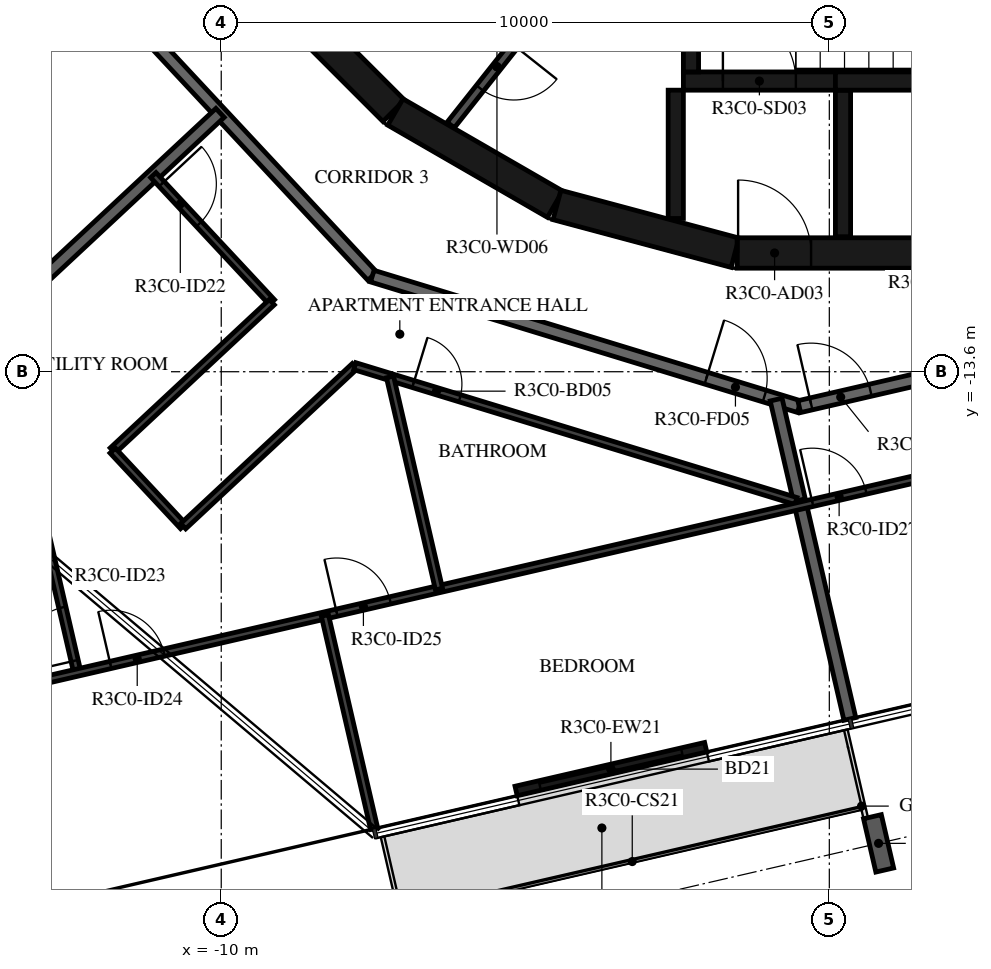
"""IFC4 building model, lengths in metres.
Left out: names, types, materials, properties, quantities, classifications, styles, units other than length and angle.
Written with IfcOpenShell. Run it as: python <this file> out.ifc"""

import sys

from ifc_helpers import new_model, si_unit, direction, frame, frame_2d, origin, origin_2d, place, context, subcontext, project, spatial, rectangle, i_section, extrude, element, fill, save


model = new_model("IFC4")
c1 = context("Model", 3, precision=1e-05, world=origin(), true_north=direction((0.0, 1.0)))
c2 = subcontext(c1, "Body", "Model", "MODEL_VIEW")
j1 = project(units=[si_unit("LENGTHUNIT", "METRE"), si_unit("PLANEANGLEUNIT", "RADIAN")], contexts=[c1])
p1 = place(None, origin())
s1 = spatial("IfcSite", under=j1, at=p1, CompositionType="ELEMENT")
p2 = place(p1, origin())
s2 = spatial("IfcBuilding", under=s1, at=p2, CompositionType="ELEMENT")
p3 = place(p2, frame((0.0, 0.0, 141.4)))
s3 = spatial("IfcBuildingStorey", under=s2, at=p3, CompositionType="ELEMENT", Elevation=141.4)
p4 = place(p3, frame((0.81, -21.356, -0.38), z_axis=(0.0, 0.0, 1.0), x_axis=(-0.974370073419, -0.224951016948, 0.0)))
e1 = element("IfcColumn", 1, at=p4, inside=s3, PredefinedType="COLUMN", context=c2, shape_type="SweptSolid", body=[
    extrude(i_section(OverallWidth=0.3, OverallDepth=0.9, WebThickness=0.019, FlangeThickness=0.035, FilletRadius=0.03, at=origin_2d()), origin(), (0.0, 0.0, 1.0), 2.616),
])
p5 = place(p3, frame((-5.151, -20.495, 0.0), z_axis=(0.0, 0.0, 1.0), x_axis=(0.974377048991, 0.224920800284, 0.0)))
e2 = element("IfcWall", 2, at=p5, inside=s3, PredefinedType="STANDARD", context=c2, shape_type="SweptSolid", body=[
    extrude(rectangle(XDim=3.2, YDim=0.16, at=frame_2d((1.6, 0.0))), origin(), (0.0, 0.0, 1.0), 3.05),
])
p6 = place(p5, frame((0.4, 0.0, 0.0)))
e3 = element("IfcOpeningElement", 3, at=p6, cuts=e2, PredefinedType="OPENING", context=c2, shape_type="SweptSolid", body=[
    extrude(rectangle(XDim=2.4, YDim=2.4, at=frame_2d((1.2, 1.2))), frame((0.0, 0.09, 0.0), z_axis=(0.0, -1.0, 0.0), x_axis=(1.0, 0.0, 0.0)), (0.0, 0.0, 1.0), 0.18),
])
p7 = place(p3, frame((-9.308, -7.164, 0.0), z_axis=(0.0, 0.0, 1.0), x_axis=(0.707106781187, -0.707106781187, 0.0)))
e4 = element("IfcWall", 4, at=p7, inside=s3, PredefinedType="SHEAR", context=c2, shape_type="SweptSolid", body=[
    extrude(rectangle(XDim=3.032, YDim=0.5, at=frame_2d((1.516, 0.0))), origin(), (0.0, 0.0, 1.0), 3.05),
])
for number, where, z_axis, x_axis in (
    (5, (-7.137, -9.329, 0.0), (0.0, 0.0, 1.0), (0.866, -0.5, 0.0)),
    (6, (-4.479, -10.858, 0.0), (0.0, 0.0, 1.0), (0.966, -0.259, 0.0)),
):
    element("IfcWall", number, at=place(p3, frame(where, z_axis=z_axis, x_axis=x_axis)), inside=s3, PredefinedType="SHEAR", context=c2, shape_type="SweptSolid", body=[
        extrude(rectangle(XDim=3.033, YDim=0.5, at=frame_2d((1.516, 0.0))), origin(), (0.0, 0.0, 1.0), 3.05),
    ])
p8 = place(p3, frame((-1.516, -11.647, 0.0), z_axis=(0.0, 0.0, 1.0), x_axis=(1.0, 0.0, 0.0)))
e7 = element("IfcWall", 7, at=p8, inside=s3, PredefinedType="SHEAR", context=c2, shape_type="SweptSolid", body=[
    extrude(rectangle(XDim=3.033, YDim=0.5, at=frame_2d((1.516, 0.0))), origin(), (0.0, 0.0, 1.0), 3.05),
])
p9 = place(p8, frame((0.016, 0.0, 0.0)))
e8 = element("IfcOpeningElement", 8, at=p9, cuts=e7, PredefinedType="OPENING", context=c2, shape_type="SweptSolid", body=[
    extrude(rectangle(XDim=1.2, YDim=2.1, at=frame_2d((0.6, 1.05))), frame((0.0, 0.26, 0.0), z_axis=(0.0, -1.0, 0.0), x_axis=(1.0, 0.0, 0.0)), (0.0, 0.0, 1.0), 0.52),
])
p10 = place(p3, frame((-2.275, -8.67, 0.0), z_axis=(0.0, 0.0, 1.0), x_axis=(0.0, 1.0, 0.0)))
e9 = element("IfcWall", 9, at=p10, inside=s3, PredefinedType="SHEAR", context=c2, shape_type="SweptSolid", body=[
    extrude(rectangle(XDim=3.32, YDim=0.25, at=frame_2d((1.66, 0.0))), origin(), (0.0, 0.0, 1.0), 3.05),
])
p11 = place(p3, frame((0.1, -8.82, 0.0), z_axis=(0.0, 0.0, 1.0), x_axis=(1.0, 0.0, 0.0)))
e10 = element("IfcWall", 10, at=p11, inside=s3, PredefinedType="SHEAR", context=c2, shape_type="SweptSolid", body=[
    extrude(rectangle(XDim=4.55, YDim=0.3, at=frame_2d((2.275, 0.0))), origin(), (0.0, 0.0, 1.0), 3.05),
])
p12 = place(p3, frame((-2.4, -8.82, 0.0), z_axis=(0.0, 0.0, 1.0), x_axis=(1.0, 0.0, 0.0)))
e11 = element("IfcWall", 11, at=p12, inside=s3, PredefinedType="SHEAR", context=c2, shape_type="SweptSolid", body=[
    extrude(rectangle(XDim=2.5, YDim=0.3, at=frame_2d((1.25, 0.0))), origin(), (0.0, 0.0, 1.0), 3.05),
])
p13 = place(p12, frame((0.65, 0.0, 0.0)))
e12 = element("IfcOpeningElement", 12, at=p13, cuts=e11, PredefinedType="OPENING", context=c2, shape_type="SweptSolid", body=[
    extrude(rectangle(XDim=1.2, YDim=2.1, at=frame_2d((0.6, 1.05))), frame((0.0, 0.16, 0.0), z_axis=(0.0, -1.0, 0.0), x_axis=(1.0, 0.0, 0.0)), (0.0, 0.0, 1.0), 0.32),
])
p14 = place(p3, frame((-2.525, -8.97, 0.0), z_axis=(0.0, 0.0, 1.0), x_axis=(0.0, -1.0, 0.0)))
e13 = element("IfcWall", 13, at=p14, inside=s3, PredefinedType="SHEAR", context=c2, shape_type="SweptSolid", body=[
    extrude(rectangle(XDim=2.11, YDim=0.25, at=frame_2d((1.055, 0.0))), origin(), (0.0, 0.0, 1.0), 3.05),
])
p15 = place(p3, frame((0.225, -8.97, 0.0), z_axis=(0.0, 0.0, 1.0), x_axis=(0.0, -1.0, 0.0)))
e14 = element("IfcWall", 14, at=p15, inside=s3, PredefinedType="SHEAR", context=c2, shape_type="SweptSolid", body=[
    extrude(rectangle(XDim=2.41, YDim=0.25, at=frame_2d((1.205, 0.0))), origin(), (0.0, 0.0, 1.0), 3.05),
])
p16 = place(p3, frame((-4.706, -7.625, 0.0), z_axis=(0.0, 0.0, 1.0), x_axis=(-0.621392599334, -0.783499353856, 0.0)))
e15 = element("IfcWall", 15, at=p16, inside=s3, PredefinedType="PARTITIONING", context=c2, shape_type="SweptSolid", body=[
    extrude(rectangle(XDim=2.447, YDim=0.15, at=frame_2d((1.224, 0.0))), origin(), (0.0, 0.0, 1.0), 3.05),
])
p17 = place(p16, frame((0.774, 0.0, 0.0)))
e16 = element("IfcOpeningElement", 16, at=p17, cuts=e15, PredefinedType="OPENING", context=c2, shape_type="SweptSolid", body=[
    extrude(rectangle(XDim=0.9, YDim=2.1, at=frame_2d((0.45, 1.05))), frame((0.0, 0.085, 0.0), z_axis=(0.0, -1.0, 0.0), x_axis=(1.0, 0.0, 0.0)), (0.0, 0.0, 1.0), 0.17),
])
p18 = place(p3, frame((-12.523, -6.659, 0.0), z_axis=(0.0, 0.0, 1.0), x_axis=(0.682001841105, -0.731350455479, 0.0)))
e17 = element("IfcWall", 17, at=p18, inside=s3, PredefinedType="STANDARD", context=c2, shape_type="SweptSolid", body=[
    extrude(rectangle(XDim=7.342, YDim=0.2, at=frame_2d((3.671, 0.0))), origin(), (0.0, 0.0, 1.0), 3.05),
])
p19 = place(p3, frame((-7.516, -12.028, 0.0), z_axis=(0.0, 0.0, 1.0), x_axis=(0.956306642771, -0.292365533182, 0.0)))
e18 = element("IfcWall", 18, at=p19, inside=s3, PredefinedType="STANDARD", context=c2, shape_type="SweptSolid", body=[
    extrude(rectangle(XDim=7.342, YDim=0.2, at=frame_2d((3.671, 0.0))), origin(), (0.0, 0.0, 1.0), 3.05),
])
p20 = place(p19, frame((5.745, 0.0, 0.0)))
e19 = element("IfcOpeningElement", 19, at=p20, cuts=e18, PredefinedType="OPENING", context=c2, shape_type="SweptSolid", body=[
    extrude(rectangle(XDim=1.0, YDim=2.1, at=frame_2d((0.5, 1.05))), frame((0.0, 0.11, 0.0), z_axis=(0.0, -1.0, 0.0), x_axis=(1.0, 0.0, 0.0)), (0.0, 0.0, 1.0), 0.22),
])
p21 = place(p3, frame((-0.495, -14.175, 0.0), z_axis=(0.0, 0.0, 1.0), x_axis=(0.974376622151, 0.224922649383, 0.0)))
e20 = element("IfcWall", 20, at=p21, inside=s3, PredefinedType="STANDARD", context=c2, shape_type="SweptSolid", body=[
    extrude(rectangle(XDim=7.342, YDim=0.2, at=frame_2d((3.671, 0.0))), origin(), (0.0, 0.0, 1.0), 3.05),
])
p22 = place(p21, frame((0.2, 0.0, 0.0)))
e21 = element("IfcOpeningElement", 21, at=p22, cuts=e20, PredefinedType="OPENING", context=c2, shape_type="SweptSolid", body=[
    extrude(rectangle(XDim=1.0, YDim=2.1, at=frame_2d((0.5, 1.05))), frame((0.0, 0.11, 0.0), z_axis=(0.0, -1.0, 0.0), x_axis=(1.0, 0.0, 0.0)), (0.0, 0.0, 1.0), 0.22),
])
p23 = place(p3, frame((-13.699, -12.774, 0.0), z_axis=(0.0, 0.0, 1.0), x_axis=(0.731353758457, 0.681998299111, 0.0)))
e22 = element("IfcWall", 22, at=p23, inside=s3, PredefinedType="STANDARD", context=c2, shape_type="SweptSolid", body=[
    extrude(rectangle(XDim=5.031, YDim=0.2, at=frame_2d((2.515, 0.0))), origin(), (0.0, 0.0, 1.0), 3.05),
])
p24 = place(p3, frame((-0.492, -15.713, 0.0), z_axis=(0.0, 0.0, 1.0), x_axis=(-0.224974992875, 0.97436453783, 0.0)))
e23 = element("IfcWall", 23, at=p24, inside=s3, PredefinedType="STANDARD", context=c2, shape_type="SweptSolid", body=[
    extrude(rectangle(XDim=1.698, YDim=0.2, at=frame_2d((0.849, 0.0))), origin(), (0.0, 0.0, 1.0), 3.05),
])
p25 = place(p3, frame((0.338, -19.31, 0.0), z_axis=(0.0, 0.0, 1.0), x_axis=(-0.224943703639, 0.9743717618, 0.0)))
e24 = element("IfcWall", 24, at=p25, inside=s3, PredefinedType="STANDARD", context=c2, shape_type="SweptSolid", body=[
    extrude(rectangle(XDim=3.6, YDim=0.2, at=frame_2d((1.8, 0.0))), origin(), (0.0, 0.0, 1.0), 3.05),
])
p26 = place(p3, frame((-11.117, -10.366, 0.0), z_axis=(0.0, 0.0, 1.0), x_axis=(0.682029016154, -0.73132511315, 0.0)))
e25 = element("IfcWall", 25, at=p26, inside=s3, PredefinedType="PARTITIONING", context=c2, shape_type="SweptSolid", body=[
    extrude(rectangle(XDim=2.858, YDim=0.12, at=frame_2d((1.429, 0.0))), origin(), (0.0, 0.0, 1.0), 3.05),
])
p27 = place(p26, frame((0.2, 0.0, 0.0)))
e26 = element("IfcOpeningElement", 26, at=p27, cuts=e25, PredefinedType="OPENING", context=c2, shape_type="SweptSolid", body=[
    extrude(rectangle(XDim=0.9, YDim=2.1, at=frame_2d((0.45, 1.05))), frame((0.0, 0.07, 0.0), z_axis=(0.0, -1.0, 0.0), x_axis=(1.0, 0.0, 0.0)), (0.0, 0.0, 1.0), 0.14),
])
p28 = place(p3, frame((-9.168, -12.456, 0.0), z_axis=(0.0, 0.0, 1.0), x_axis=(-0.731372816465, -0.681977861324, 0.0)))
e27 = element("IfcWall", 27, at=p28, inside=s3, PredefinedType="PARTITIONING", context=c2, shape_type="SweptSolid", body=[
    extrude(rectangle(XDim=3.578, YDim=0.12, at=frame_2d((1.789, 0.0))), origin(), (0.0, 0.0, 1.0), 3.05),
])
p29 = place(p3, frame((-11.785, -14.897, 0.0), z_axis=(0.0, 0.0, 1.0), x_axis=(0.681975367709, -0.73137514166, 0.0)))
e28 = element("IfcWall", 28, at=p29, inside=s3, PredefinedType="PARTITIONING", context=c2, shape_type="SweptSolid", body=[
    extrude(rectangle(XDim=1.7, YDim=0.12, at=frame_2d((0.85, 0.0))), origin(), (0.0, 0.0, 1.0), 3.05),
])
p30 = place(p3, frame((-10.625, -16.14, 0.0), z_axis=(0.0, 0.0, 1.0), x_axis=(0.73135399721, 0.68199804308, 0.0)))
e29 = element("IfcWall", 29, at=p30, inside=s3, PredefinedType="PARTITIONING", context=c2, shape_type="SweptSolid", body=[
    extrude(rectangle(XDim=3.858, YDim=0.12, at=frame_2d((1.929, 0.0))), origin(), (0.0, 0.0, 1.0), 3.05),
])
p31 = place(p3, frame((-7.804, -13.509, 0.0), z_axis=(0.0, 0.0, 1.0), x_axis=(0.956309088343, -0.292357533772, 0.0)))
e30 = element("IfcWall", 30, at=p31, inside=s3, PredefinedType="PARTITIONING", context=c2, shape_type="SweptSolid", body=[
    extrude(rectangle(XDim=7.586, YDim=0.12, at=frame_2d((3.793, 0.0))), origin(), (0.0, 0.0, 1.0), 3.05),
])
p32 = place(p31, frame((1.006, 0.0, 0.0)))
e31 = element("IfcOpeningElement", 31, at=p32, cuts=e30, PredefinedType="OPENING", context=c2, shape_type="SweptSolid", body=[
    extrude(rectangle(XDim=0.8, YDim=2.1, at=frame_2d((0.4, 1.05))), frame((0.0, 0.07, 0.0), z_axis=(0.0, -1.0, 0.0), x_axis=(1.0, 0.0, 0.0)), (0.0, 0.0, 1.0), 0.14),
])
p33 = place(p3, frame((-12.366, -18.548, 0.0), z_axis=(0.0, 0.0, 1.0), x_axis=(-0.224958805164, 0.974368275335, 0.0)))
e32 = element("IfcWall", 32, at=p33, inside=s3, PredefinedType="PARTITIONING", context=c2, shape_type="SweptSolid", body=[
    extrude(rectangle(XDim=5.926, YDim=0.12, at=frame_2d((2.963, 0.0))), origin(), (0.0, 0.0, 1.0), 3.05),
])
p34 = place(p33, frame((0.2, 0.0, 0.0)))
e33 = element("IfcOpeningElement", 33, at=p34, cuts=e32, PredefinedType="OPENING", context=c2, shape_type="SweptSolid", body=[
    extrude(rectangle(XDim=0.9, YDim=2.1, at=frame_2d((0.45, 1.05))), frame((0.0, 0.07, 0.0), z_axis=(0.0, -1.0, 0.0), x_axis=(1.0, 0.0, 0.0)), (0.0, 0.0, 1.0), 0.14),
])
p35 = place(p3, frame((-14.736, -19.095, 0.0), z_axis=(0.0, 0.0, 1.0), x_axis=(0.974368335243, 0.224958545682, 0.0)))
e34 = element("IfcWall", 34, at=p35, inside=s3, PredefinedType="PARTITIONING", context=c2, shape_type="SweptSolid", body=[
    extrude(rectangle(XDim=19.263, YDim=0.12, at=frame_2d((9.632, 0.0))), origin(), (0.0, 0.0, 1.0), 3.05),
])
p36 = place(p35, frame((2.993, 0.0, 0.0)))
e35 = element("IfcOpeningElement", 35, at=p36, cuts=e34, PredefinedType="OPENING", context=c2, shape_type="SweptSolid", body=[
    extrude(rectangle(XDim=0.9, YDim=2.1, at=frame_2d((0.45, 1.05))), frame((0.0, 0.07, 0.0), z_axis=(0.0, -1.0, 0.0), x_axis=(1.0, 0.0, 0.0)), (0.0, 0.0, 1.0), 0.14),
])
p37 = place(p35, frame((6.81, 0.0, 0.0)))
e36 = element("IfcOpeningElement", 36, at=p37, cuts=e34, PredefinedType="OPENING", context=c2, shape_type="SweptSolid", body=[
    extrude(rectangle(XDim=0.9, YDim=2.1, at=frame_2d((0.45, 1.05))), frame((0.0, 0.07, 0.0), z_axis=(0.0, -1.0, 0.0), x_axis=(1.0, 0.0, 0.0)), (0.0, 0.0, 1.0), 0.14),
])
p38 = place(p35, frame((0.2, 0.0, 0.0)))
e37 = element("IfcOpeningElement", 37, at=p38, cuts=e34, PredefinedType="OPENING", context=c2, shape_type="SweptSolid", body=[
    extrude(rectangle(XDim=0.9, YDim=2.1, at=frame_2d((0.45, 1.05))), frame((0.0, 0.07, 0.0), z_axis=(0.0, -1.0, 0.0), x_axis=(1.0, 0.0, 0.0)), (0.0, 0.0, 1.0), 0.14),
])
p39 = place(p35, frame((14.839, 0.0, 0.0)))
e38 = element("IfcOpeningElement", 38, at=p39, cuts=e34, PredefinedType="OPENING", context=c2, shape_type="SweptSolid", body=[
    extrude(rectangle(XDim=0.9, YDim=2.1, at=frame_2d((0.45, 1.05))), frame((0.0, 0.07, 0.0), z_axis=(0.0, -1.0, 0.0), x_axis=(1.0, 0.0, 0.0)), (0.0, 0.0, 1.0), 0.14),
])
p40 = place(p3, frame((-6.419, -17.175, 0.0), z_axis=(0.0, 0.0, 1.0), x_axis=(-0.224979003559, 0.974363611778, 0.0)))
e39 = element("IfcWall", 39, at=p40, inside=s3, PredefinedType="PARTITIONING", context=c2, shape_type="SweptSolid", body=[
    extrude(rectangle(XDim=3.581, YDim=0.12, at=frame_2d((1.791, 0.0))), origin(), (0.0, 0.0, 1.0), 3.05),
])
p41 = place(p3, frame((-7.486, -21.116, 0.0), z_axis=(0.0, 0.0, 1.0), x_axis=(-0.224943703639, 0.9743717618, 0.0)))
e40 = element("IfcWall", 40, at=p41, inside=s3, PredefinedType="PARTITIONING", context=c2, shape_type="SweptSolid", body=[
    extrude(rectangle(XDim=3.6, YDim=0.12, at=frame_2d((1.8, 0.0))), origin(), (0.0, 0.0, 1.0), 3.05),
])
p42 = place(p6, origin())
e41 = element("IfcDoor", 41, at=p42, inside=s3, OperationType="DOUBLE_DOOR_SLIDING", PredefinedType="DOOR", context=c2, shape_type="SweptSolid", body=[
    extrude(rectangle(XDim=2.4, YDim=2.4, at=frame_2d((1.2, 1.2))), frame((0.0, 0.025, 0.0), z_axis=(0.0, -1.0, 0.0), x_axis=(1.0, 0.0, 0.0)), (0.0, 0.0, 1.0), 0.05),
])
fill(e3, e41)
p43 = place(p13, origin())
e42 = element("IfcDoor", 42, at=p43, inside=s3, OperationType="SINGLE_SWING_LEFT", PredefinedType="DOOR", context=c2, shape_type="SweptSolid", body=[
    extrude(rectangle(XDim=1.2, YDim=2.1, at=frame_2d((0.6, 1.05))), frame((0.0, 0.025, 0.0), z_axis=(0.0, -1.0, 0.0), x_axis=(1.0, 0.0, 0.0)), (0.0, 0.0, 1.0), 0.05),
])
fill(e12, e42)
p44 = place(p9, origin())
e43 = element("IfcDoor", 43, at=p44, inside=s3, OperationType="SINGLE_SWING_RIGHT", PredefinedType="DOOR", context=c2, shape_type="SweptSolid", body=[
    extrude(rectangle(XDim=1.2, YDim=2.1, at=frame_2d((0.6, 1.05))), frame((0.0, 0.025, 0.0), z_axis=(0.0, -1.0, 0.0), x_axis=(1.0, 0.0, 0.0)), (0.0, 0.0, 1.0), 0.05),
])
fill(e8, e43)
p45 = place(p17, origin())
e44 = element("IfcDoor", 44, at=p45, inside=s3, OperationType="SINGLE_SWING_LEFT", PredefinedType="DOOR", context=c2, shape_type="SweptSolid", body=[
    extrude(rectangle(XDim=0.9, YDim=2.1, at=frame_2d((0.45, 1.05))), frame((0.0, 0.025, 0.0), z_axis=(0.0, -1.0, 0.0), x_axis=(1.0, 0.0, 0.0)), (0.0, 0.0, 1.0), 0.05),
])
fill(e16, e44)
p46 = place(p20, origin())
e45 = element("IfcDoor", 45, at=p46, inside=s3, OperationType="SINGLE_SWING_LEFT", PredefinedType="DOOR", context=c2, shape_type="SweptSolid", body=[
    extrude(rectangle(XDim=1.0, YDim=2.1, at=frame_2d((0.5, 1.05))), frame((0.0, 0.025, 0.0), z_axis=(0.0, -1.0, 0.0), x_axis=(1.0, 0.0, 0.0)), (0.0, 0.0, 1.0), 0.05),
])
fill(e19, e45)
p47 = place(p27, origin())
e46 = element("IfcDoor", 46, at=p47, inside=s3, OperationType="SINGLE_SWING_LEFT", PredefinedType="DOOR", context=c2, shape_type="SweptSolid", body=[
    extrude(rectangle(XDim=0.9, YDim=2.1, at=frame_2d((0.45, 1.05))), frame((0.0, 0.025, 0.0), z_axis=(0.0, -1.0, 0.0), x_axis=(1.0, 0.0, 0.0)), (0.0, 0.0, 1.0), 0.05),
])
fill(e26, e46)
p48 = place(p32, origin())
e47 = element("IfcDoor", 47, at=p48, inside=s3, OperationType="SINGLE_SWING_LEFT", PredefinedType="DOOR", context=c2, shape_type="SweptSolid", body=[
    extrude(rectangle(XDim=0.8, YDim=2.1, at=frame_2d((0.4, 1.05))), frame((0.0, 0.025, 0.0), z_axis=(0.0, -1.0, 0.0), x_axis=(1.0, 0.0, 0.0)), (0.0, 0.0, 1.0), 0.05),
])
fill(e31, e47)
p49 = place(p34, origin())
e48 = element("IfcDoor", 48, at=p49, inside=s3, OperationType="SINGLE_SWING_LEFT", PredefinedType="DOOR", context=c2, shape_type="SweptSolid", body=[
    extrude(rectangle(XDim=0.9, YDim=2.1, at=frame_2d((0.45, 1.05))), frame((0.0, 0.025, 0.0), z_axis=(0.0, -1.0, 0.0), x_axis=(1.0, 0.0, 0.0)), (0.0, 0.0, 1.0), 0.05),
])
fill(e33, e48)
p50 = place(p36, origin())
e49 = element("IfcDoor", 49, at=p50, inside=s3, OperationType="SINGLE_SWING_LEFT", PredefinedType="DOOR", context=c2, shape_type="SweptSolid", body=[
    extrude(rectangle(XDim=0.9, YDim=2.1, at=frame_2d((0.45, 1.05))), frame((0.0, 0.025, 0.0), z_axis=(0.0, -1.0, 0.0), x_axis=(1.0, 0.0, 0.0)), (0.0, 0.0, 1.0), 0.05),
])
fill(e35, e49)
p51 = place(p37, origin())
e50 = element("IfcDoor", 50, at=p51, inside=s3, OperationType="SINGLE_SWING_LEFT", PredefinedType="DOOR", context=c2, shape_type="SweptSolid", body=[
    extrude(rectangle(XDim=0.9, YDim=2.1, at=frame_2d((0.45, 1.05))), frame((0.0, 0.025, 0.0), z_axis=(0.0, -1.0, 0.0), x_axis=(1.0, 0.0, 0.0)), (0.0, 0.0, 1.0), 0.05),
])
fill(e36, e50)
p52 = place(p22, origin())
e51 = element("IfcDoor", 51, at=p52, inside=s3, OperationType="SINGLE_SWING_LEFT", PredefinedType="DOOR", context=c2, shape_type="SweptSolid", body=[
    extrude(rectangle(XDim=1.0, YDim=2.1, at=frame_2d((0.5, 1.05))), frame((0.0, 0.025, 0.0), z_axis=(0.0, -1.0, 0.0), x_axis=(1.0, 0.0, 0.0)), (0.0, 0.0, 1.0), 0.05),
])
fill(e21, e51)
p53 = place(p39, origin())
e52 = element("IfcDoor", 52, at=p53, inside=s3, OperationType="SINGLE_SWING_LEFT", PredefinedType="DOOR", context=c2, shape_type="SweptSolid", body=[
    extrude(rectangle(XDim=0.9, YDim=2.1, at=frame_2d((0.45, 1.05))), frame((0.0, 0.025, 0.0), z_axis=(0.0, -1.0, 0.0), x_axis=(1.0, 0.0, 0.0)), (0.0, 0.0, 1.0), 0.05),
])
fill(e38, e52)
save(model, sys.argv[1])
